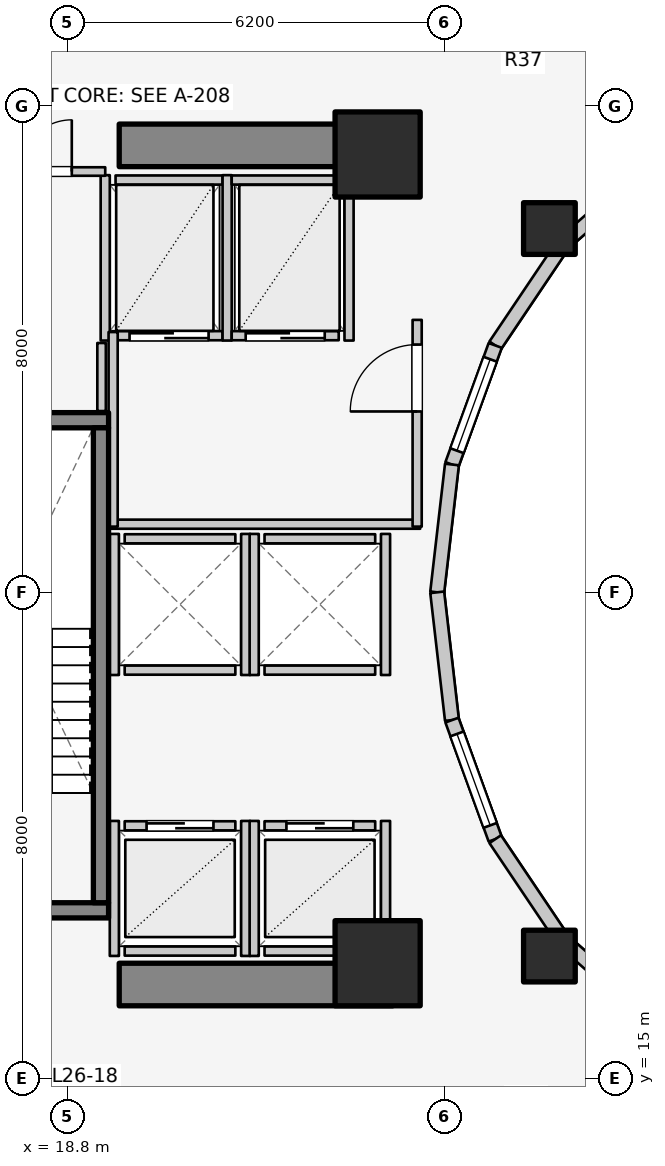
"""IFC4 building model, lengths in metres.
Left out: names, types, materials, properties, quantities, classifications, styles, units other than length and angle.
Written with IfcOpenShell. Run it as: python <this file> out.ifc"""

import sys

from ifc_helpers import new_model, si_unit, direction, frame, frame_2d, origin, origin_2d, place, context, subcontext, project, spatial, rectangle, extrude, element, fill, save


model = new_model("IFC4")
c1 = context("Model", 3, precision=1e-05, world=origin(), true_north=direction((0.0, 1.0)))
c2 = subcontext(c1, "Body", "Model", "MODEL_VIEW")
j1 = project(units=[si_unit("LENGTHUNIT", "METRE"), si_unit("PLANEANGLEUNIT", "RADIAN")], contexts=[c1])
p1 = place(None, origin())
s1 = spatial("IfcSite", under=j1, at=p1, CompositionType="ELEMENT")
p2 = place(p1, origin())
s2 = spatial("IfcBuilding", under=s1, at=p2, CompositionType="ELEMENT")
p3 = place(p2, frame((0.0, 0.0, 88.7)))
s3 = spatial("IfcBuildingStorey", under=s2, at=p3, CompositionType="ELEMENT", Elevation=88.7)
for number, where, z_axis, x_axis in (
    (1, (19.65, 16.55, 0.0), (0.0, 0.0, 1.0), (1.0, 0.0, 0.0)),
    (2, (19.65, 30.35, 0.0), (0.0, 0.0, 1.0), (1.0, 0.0, 0.0)),
):
    element("IfcWall", number, at=place(p3, frame(where, z_axis=z_axis, x_axis=x_axis)), inside=s3, PredefinedType="SHEAR", context=c2, shape_type="SweptSolid", body=[
        extrude(rectangle(XDim=4.5, YDim=0.7, at=frame_2d((2.25, 0.0))), origin(), (0.0, 0.0, 1.0), 3.1),
    ])
p4 = place(p3, frame((16.105, 17.77, 0.0), z_axis=(0.0, 0.0, 1.0), x_axis=(1.0, 0.0, 0.0)))
e3 = element("IfcWall", 3, at=p4, inside=s3, PredefinedType="SOLIDWALL", context=c2, shape_type="SweptSolid", body=[
    extrude(rectangle(XDim=3.37, YDim=0.25, at=frame_2d((1.685, 0.0))), origin(), (0.0, 0.0, 1.0), 3.1),
])
p5 = place(p4, frame((1.135, 0.0, 0.0)))
e4 = element("IfcOpeningElement", 4, at=p5, cuts=e3, PredefinedType="OPENING", context=c2, shape_type="SweptSolid", body=[
    extrude(rectangle(XDim=1.1, YDim=2.1, at=frame_2d((0.55, 1.05))), frame((0.0, 0.135, 0.0), z_axis=(0.0, -1.0, 0.0), x_axis=(1.0, 0.0, 0.0)), (0.0, 0.0, 1.0), 0.27),
])
p6 = place(p3, frame((16.105, 25.83, 0.0), z_axis=(0.0, 0.0, 1.0), x_axis=(1.0, 0.0, 0.0)))
e5 = element("IfcWall", 5, at=p6, inside=s3, PredefinedType="SOLIDWALL", context=c2, shape_type="SweptSolid", body=[
    extrude(rectangle(XDim=3.37, YDim=0.25, at=frame_2d((1.685, 0.0))), origin(), (0.0, 0.0, 1.0), 3.1),
])
p7 = place(p3, frame((19.35, 17.895, 0.0), z_axis=(0.0, 0.0, 1.0), x_axis=(0.0, 1.0, 0.0)))
e6 = element("IfcWall", 6, at=p7, inside=s3, PredefinedType="SOLIDWALL", context=c2, shape_type="SweptSolid", body=[
    extrude(rectangle(XDim=7.81, YDim=0.25, at=frame_2d((3.905, 0.0))), origin(), (0.0, 0.0, 1.0), 3.1),
])
for number, where, z_axis, x_axis in (
    (7, (23.9, 16.9, 0.0), (0.0, 0.0, 1.0), (1.0, 0.0, 0.0)),
    (8, (23.9, 30.2, 0.0), (0.0, 0.0, 1.0), (1.0, 0.0, 0.0)),
):
    element("IfcColumn", number, at=place(p3, frame(where, z_axis=z_axis, x_axis=x_axis)), inside=s3, PredefinedType="COLUMN", context=c2, shape_type="SweptSolid", body=[
        extrude(rectangle(XDim=1.4, YDim=1.4, at=origin_2d()), origin(), (0.0, 0.0, 1.0), 3.1),
    ])
for number, where, z_axis, x_axis in (
    (9, (26.725, 28.982, 0.0), (0.0, 0.0, 1.0), (1.0, 0.0, 0.0)),
    (10, (26.725, 17.018, 0.0), (0.0, 0.0, 1.0), (1.0, 0.0, 0.0)),
):
    element("IfcColumn", number, at=place(p3, frame(where, z_axis=z_axis, x_axis=x_axis)), inside=s3, PredefinedType="COLUMN", context=c2, shape_type="SweptSolid", body=[
        extrude(rectangle(XDim=0.85, YDim=0.85, at=origin_2d()), origin(), (0.0, 0.0, 1.0), 3.1),
    ])
p8 = place(p3, frame((28.44, 30.032, 0.0), z_axis=(0.0, 0.0, 1.0), x_axis=(-0.752576694707, -0.658504607869, 0.0)))
e11 = element("IfcWall", 11, at=p8, inside=s3, PredefinedType="STANDARD", context=c2, shape_type="SweptSolid", body=[
    extrude(rectangle(XDim=1.959, YDim=0.23, at=frame_2d((0.98, 0.0))), origin(), (0.0, 0.0, 1.0), 2.16),
])
p9 = place(p3, frame((26.965, 28.742, 0.0), z_axis=(0.0, 0.0, 1.0), x_axis=(-0.558197800898, -0.829707909492, 0.0)))
e12 = element("IfcWall", 12, at=p9, inside=s3, PredefinedType="STANDARD", context=c2, shape_type="SweptSolid", body=[
    extrude(rectangle(XDim=2.027, YDim=0.23, at=frame_2d((1.013, 0.0))), origin(), (0.0, 0.0, 1.0), 2.16),
])
p10 = place(p3, frame((25.834, 27.06, 0.0), z_axis=(0.0, 0.0, 1.0), x_axis=(-0.341423187295, -0.93990968033, 0.0)))
e13 = element("IfcWall", 13, at=p10, inside=s3, PredefinedType="STANDARD", context=c2, shape_type="SweptSolid", body=[
    extrude(rectangle(XDim=2.084, YDim=0.23, at=frame_2d((1.042, 0.0))), origin(), (0.0, 0.0, 1.0), 2.84),
])
p11 = place(p10, frame((0.242, 0.0, 0.85)))
e14 = element("IfcOpeningElement", 14, at=p11, cuts=e13, PredefinedType="OPENING", context=c2, shape_type="SweptSolid", body=[
    extrude(rectangle(XDim=1.6, YDim=1.65, at=frame_2d((0.8, 0.825))), frame((0.0, 0.125, 0.0), z_axis=(0.0, -1.0, 0.0), x_axis=(1.0, 0.0, 0.0)), (0.0, 0.0, 1.0), 0.25),
])
for number, where, z_axis, x_axis in (
    (15, (25.123, 25.102, 0.0), (0.0, 0.0, 1.0), (-0.115, -0.993, 0.0)),
    (16, (24.88, 23.0, 0.0), (0.0, 0.0, 1.0), (0.115, -0.993, 0.0)),
):
    element("IfcWall", number, at=place(p3, frame(where, z_axis=z_axis, x_axis=x_axis)), inside=s3, PredefinedType="STANDARD", context=c2, shape_type="SweptSolid", body=[
        extrude(rectangle(XDim=2.115, YDim=0.23, at=frame_2d((1.058, 0.0))), origin(), (0.0, 0.0, 1.0), 2.84),
    ])
p12 = place(p3, frame((25.123, 20.898, 0.0), z_axis=(0.0, 0.0, 1.0), x_axis=(0.341423187295, -0.93990968033, 0.0)))
e17 = element("IfcWall", 17, at=p12, inside=s3, PredefinedType="STANDARD", context=c2, shape_type="SweptSolid", body=[
    extrude(rectangle(XDim=2.084, YDim=0.23, at=frame_2d((1.042, 0.0))), origin(), (0.0, 0.0, 1.0), 2.84),
])
p13 = place(p12, frame((0.242, 0.0, 0.85)))
e18 = element("IfcOpeningElement", 18, at=p13, cuts=e17, PredefinedType="OPENING", context=c2, shape_type="SweptSolid", body=[
    extrude(rectangle(XDim=1.6, YDim=1.65, at=frame_2d((0.8, 0.825))), frame((0.0, 0.125, 0.0), z_axis=(0.0, -1.0, 0.0), x_axis=(1.0, 0.0, 0.0)), (0.0, 0.0, 1.0), 0.25),
])
p14 = place(p3, frame((25.834, 18.94, 0.0), z_axis=(0.0, 0.0, 1.0), x_axis=(0.558197800898, -0.829707909492, 0.0)))
e19 = element("IfcWall", 19, at=p14, inside=s3, PredefinedType="STANDARD", context=c2, shape_type="SweptSolid", body=[
    extrude(rectangle(XDim=2.027, YDim=0.23, at=frame_2d((1.013, 0.0))), origin(), (0.0, 0.0, 1.0), 2.16),
])
p15 = place(p3, frame((26.965, 17.258, 0.0), z_axis=(0.0, 0.0, 1.0), x_axis=(0.752576694707, -0.658504607869, 0.0)))
e20 = element("IfcWall", 20, at=p15, inside=s3, PredefinedType="STANDARD", context=c2, shape_type="SweptSolid", body=[
    extrude(rectangle(XDim=1.959, YDim=0.23, at=frame_2d((0.98, 0.0))), origin(), (0.0, 0.0, 1.0), 2.16),
])
p16 = place(p3, frame((19.74, 19.16, 0.0), z_axis=(0.0, 0.0, 1.0), x_axis=(1.0, 0.0, 0.0)))
e21 = element("IfcWall", 21, at=p16, inside=s3, PredefinedType="SOLIDWALL", context=c2, shape_type="SweptSolid", body=[
    extrude(rectangle(XDim=1.82, YDim=0.15, at=frame_2d((0.91, 0.0))), origin(), (0.0, 0.0, 1.0), 2.855),
])
p17 = place(p16, frame((0.36, 0.0, 0.0)))
e22 = element("IfcOpeningElement", 22, at=p17, cuts=e21, PredefinedType="OPENING", context=c2, shape_type="SweptSolid", body=[
    extrude(rectangle(XDim=1.1, YDim=2.1, at=frame_2d((0.55, 1.05))), frame((0.0, 0.085, 0.0), z_axis=(0.0, -1.0, 0.0), x_axis=(1.0, 0.0, 0.0)), (0.0, 0.0, 1.0), 0.17),
])
p18 = place(p3, frame((19.74, 17.1, 0.0), z_axis=(0.0, 0.0, 1.0), x_axis=(1.0, 0.0, 0.0)))
e23 = element("IfcWall", 23, at=p18, inside=s3, PredefinedType="SOLIDWALL", context=c2, shape_type="SweptSolid", body=[
    extrude(rectangle(XDim=1.82, YDim=0.15, at=frame_2d((0.91, 0.0))), origin(), (0.0, 0.0, 1.0), 2.855),
])
p19 = place(p3, frame((19.57, 17.02, 0.0), z_axis=(0.0, 0.0, 1.0), x_axis=(0.0, 1.0, 0.0)))
e24 = element("IfcWall", 24, at=p19, inside=s3, PredefinedType="SOLIDWALL", context=c2, shape_type="SweptSolid", body=[
    extrude(rectangle(XDim=2.22, YDim=0.15, at=frame_2d((1.11, 0.0))), origin(), (0.0, 0.0, 1.0), 2.12),
])
p20 = place(p3, frame((21.73, 17.02, 0.0), z_axis=(0.0, 0.0, 1.0), x_axis=(0.0, 1.0, 0.0)))
e25 = element("IfcWall", 25, at=p20, inside=s3, PredefinedType="SOLIDWALL", context=c2, shape_type="SweptSolid", body=[
    extrude(rectangle(XDim=2.22, YDim=0.15, at=frame_2d((1.11, 0.0))), origin(), (0.0, 0.0, 1.0), 2.855),
])
p21 = place(p3, frame((22.04, 19.16, 0.0), z_axis=(0.0, 0.0, 1.0), x_axis=(1.0, 0.0, 0.0)))
e26 = element("IfcWall", 26, at=p21, inside=s3, PredefinedType="SOLIDWALL", context=c2, shape_type="SweptSolid", body=[
    extrude(rectangle(XDim=1.82, YDim=0.15, at=frame_2d((0.91, 0.0))), origin(), (0.0, 0.0, 1.0), 2.12),
])
p22 = place(p21, frame((0.36, 0.0, 0.0)))
e27 = element("IfcOpeningElement", 27, at=p22, cuts=e26, PredefinedType="OPENING", context=c2, shape_type="SweptSolid", body=[
    extrude(rectangle(XDim=1.1, YDim=2.1, at=frame_2d((0.55, 1.05))), frame((0.0, 0.085, 0.0), z_axis=(0.0, -1.0, 0.0), x_axis=(1.0, 0.0, 0.0)), (0.0, 0.0, 1.0), 0.17),
])
p23 = place(p3, frame((22.04, 17.1, 0.0), z_axis=(0.0, 0.0, 1.0), x_axis=(1.0, 0.0, 0.0)))
e28 = element("IfcWall", 28, at=p23, inside=s3, PredefinedType="SOLIDWALL", context=c2, shape_type="SweptSolid", body=[
    extrude(rectangle(XDim=1.82, YDim=0.15, at=frame_2d((0.91, 0.0))), origin(), (0.0, 0.0, 1.0), 2.12),
])
p24 = place(p3, frame((21.87, 17.02, 0.0), z_axis=(0.0, 0.0, 1.0), x_axis=(0.0, 1.0, 0.0)))
e29 = element("IfcWall", 29, at=p24, inside=s3, PredefinedType="SOLIDWALL", context=c2, shape_type="SweptSolid", body=[
    extrude(rectangle(XDim=2.22, YDim=0.15, at=frame_2d((1.11, 0.0))), origin(), (0.0, 0.0, 1.0), 2.855),
])
p25 = place(p3, frame((24.03, 17.02, 0.0), z_axis=(0.0, 0.0, 1.0), x_axis=(0.0, 1.0, 0.0)))
e30 = element("IfcWall", 30, at=p25, inside=s3, PredefinedType="SOLIDWALL", context=c2, shape_type="SweptSolid", body=[
    extrude(rectangle(XDim=2.22, YDim=0.15, at=frame_2d((1.11, 0.0))), origin(), (0.0, 0.0, 1.0), 2.12),
])
for number, where, z_axis, x_axis in (
    (31, (19.74, 21.72, 0.0), (0.0, 0.0, 1.0), (1.0, 0.0, 0.0)),
    (32, (19.74, 23.88, 0.0), (0.0, 0.0, 1.0), (1.0, 0.0, 0.0)),
):
    element("IfcWall", number, at=place(p3, frame(where, z_axis=z_axis, x_axis=x_axis)), inside=s3, PredefinedType="SOLIDWALL", context=c2, shape_type="SweptSolid", body=[
        extrude(rectangle(XDim=1.82, YDim=0.15, at=frame_2d((0.91, 0.0))), origin(), (0.0, 0.0, 1.0), 2.855),
    ])
for number, where, z_axis, x_axis in (
    (33, (19.57, 21.64, 0.0), (0.0, 0.0, 1.0), (0.0, 1.0, 0.0)),
    (34, (21.73, 21.64, 0.0), (0.0, 0.0, 1.0), (0.0, 1.0, 0.0)),
):
    element("IfcWall", number, at=place(p3, frame(where, z_axis=z_axis, x_axis=x_axis)), inside=s3, PredefinedType="SOLIDWALL", context=c2, shape_type="SweptSolid", body=[
        extrude(rectangle(XDim=2.32, YDim=0.15, at=frame_2d((1.16, 0.0))), origin(), (0.0, 0.0, 1.0), 2.855),
    ])
for number, where, z_axis, x_axis in (
    (35, (22.04, 21.72, 0.0), (0.0, 0.0, 1.0), (1.0, 0.0, 0.0)),
    (36, (22.04, 23.88, 0.0), (0.0, 0.0, 1.0), (1.0, 0.0, 0.0)),
):
    element("IfcWall", number, at=place(p3, frame(where, z_axis=z_axis, x_axis=x_axis)), inside=s3, PredefinedType="SOLIDWALL", context=c2, shape_type="SweptSolid", body=[
        extrude(rectangle(XDim=1.82, YDim=0.15, at=frame_2d((0.91, 0.0))), origin(), (0.0, 0.0, 1.0), 2.12),
    ])
p26 = place(p3, frame((21.87, 21.64, 0.0), z_axis=(0.0, 0.0, 1.0), x_axis=(0.0, 1.0, 0.0)))
e37 = element("IfcWall", 37, at=p26, inside=s3, PredefinedType="SOLIDWALL", context=c2, shape_type="SweptSolid", body=[
    extrude(rectangle(XDim=2.32, YDim=0.15, at=frame_2d((1.16, 0.0))), origin(), (0.0, 0.0, 1.0), 2.855),
])
p27 = place(p3, frame((24.03, 21.64, 0.0), z_axis=(0.0, 0.0, 1.0), x_axis=(0.0, 1.0, 0.0)))
e38 = element("IfcWall", 38, at=p27, inside=s3, PredefinedType="SOLIDWALL", context=c2, shape_type="SweptSolid", body=[
    extrude(rectangle(XDim=2.32, YDim=0.15, at=frame_2d((1.16, 0.0))), origin(), (0.0, 0.0, 1.0), 2.12),
])
p28 = place(p3, frame((19.59, 27.22, 0.0), z_axis=(0.0, 0.0, 1.0), x_axis=(1.0, 0.0, 0.0)))
e39 = element("IfcWall", 39, at=p28, inside=s3, PredefinedType="SOLIDWALL", context=c2, shape_type="SweptSolid", body=[
    extrude(rectangle(XDim=1.76, YDim=0.15, at=frame_2d((0.88, 0.0))), origin(), (0.0, 0.0, 1.0), 2.855),
])
p29 = place(p28, frame((0.23, 0.0, 0.0)))
e40 = element("IfcOpeningElement", 40, at=p29, cuts=e39, PredefinedType="OPENING", context=c2, shape_type="SweptSolid", body=[
    extrude(rectangle(XDim=1.3, YDim=2.1, at=frame_2d((0.65, 1.05))), frame((0.0, 0.085, 0.0), z_axis=(0.0, -1.0, 0.0), x_axis=(1.0, 0.0, 0.0)), (0.0, 0.0, 1.0), 0.17),
])
p30 = place(p3, frame((19.59, 29.78, 0.0), z_axis=(0.0, 0.0, 1.0), x_axis=(1.0, 0.0, 0.0)))
e41 = element("IfcWall", 41, at=p30, inside=s3, PredefinedType="SOLIDWALL", context=c2, shape_type="SweptSolid", body=[
    extrude(rectangle(XDim=1.76, YDim=0.15, at=frame_2d((0.88, 0.0))), origin(), (0.0, 0.0, 1.0), 2.855),
])
for number, where, z_axis, x_axis in (
    (42, (19.42, 27.14, 0.0), (0.0, 0.0, 1.0), (0.0, 1.0, 0.0)),
    (43, (21.425, 27.14, 0.0), (0.0, 0.0, 1.0), (0.0, 1.0, 0.0)),
):
    element("IfcWall", number, at=place(p3, frame(where, z_axis=z_axis, x_axis=x_axis)), inside=s3, PredefinedType="SOLIDWALL", context=c2, shape_type="SweptSolid", body=[
        extrude(rectangle(XDim=2.72, YDim=0.15, at=frame_2d((1.36, 0.0))), origin(), (0.0, 0.0, 1.0), 2.855),
    ])
p31 = place(p3, frame((21.5, 27.22, 0.0), z_axis=(0.0, 0.0, 1.0), x_axis=(1.0, 0.0, 0.0)))
e44 = element("IfcWall", 44, at=p31, inside=s3, PredefinedType="SOLIDWALL", context=c2, shape_type="SweptSolid", body=[
    extrude(rectangle(XDim=1.76, YDim=0.15, at=frame_2d((0.88, 0.0))), origin(), (0.0, 0.0, 1.0), 2.855),
])
p32 = place(p31, frame((0.23, 0.0, 0.0)))
e45 = element("IfcOpeningElement", 45, at=p32, cuts=e44, PredefinedType="OPENING", context=c2, shape_type="SweptSolid", body=[
    extrude(rectangle(XDim=1.3, YDim=2.1, at=frame_2d((0.65, 1.05))), frame((0.0, 0.085, 0.0), z_axis=(0.0, -1.0, 0.0), x_axis=(1.0, 0.0, 0.0)), (0.0, 0.0, 1.0), 0.17),
])
p33 = place(p3, frame((21.5, 29.78, 0.0), z_axis=(0.0, 0.0, 1.0), x_axis=(1.0, 0.0, 0.0)))
e46 = element("IfcWall", 46, at=p33, inside=s3, PredefinedType="SOLIDWALL", context=c2, shape_type="SweptSolid", body=[
    extrude(rectangle(XDim=1.76, YDim=0.15, at=frame_2d((0.88, 0.0))), origin(), (0.0, 0.0, 1.0), 2.855),
])
p34 = place(p3, frame((23.43, 27.14, 0.0), z_axis=(0.0, 0.0, 1.0), x_axis=(0.0, 1.0, 0.0)))
e47 = element("IfcWall", 47, at=p34, inside=s3, PredefinedType="SOLIDWALL", context=c2, shape_type="SweptSolid", body=[
    extrude(rectangle(XDim=2.72, YDim=0.15, at=frame_2d((1.36, 0.0))), origin(), (0.0, 0.0, 1.0), 2.855),
])
p35 = place(p3, frame((19.52, 24.12, 0.0), z_axis=(0.0, 0.0, 1.0), x_axis=(1.0, 0.0, 0.0)))
e48 = element("IfcWall", 48, at=p35, inside=s3, PredefinedType="PARTITIONING", context=c2, shape_type="SweptSolid", body=[
    extrude(rectangle(XDim=5.08, YDim=0.15, at=frame_2d((2.54, 0.0))), origin(), (0.0, 0.0, 1.0), 2.12),
])
p36 = place(p3, frame((19.55, 24.08, 0.0), z_axis=(0.0, 0.0, 1.0), x_axis=(0.0, 1.0, 0.0)))
e49 = element("IfcWall", 49, at=p36, inside=s3, PredefinedType="PARTITIONING", context=c2, shape_type="SweptSolid", body=[
    extrude(rectangle(XDim=3.2, YDim=0.15, at=frame_2d((1.6, 0.0))), origin(), (0.0, 0.0, 1.0), 2.855),
])
p37 = place(p3, frame((24.55, 24.08, 0.0), z_axis=(0.0, 0.0, 1.0), x_axis=(0.0, 1.0, 0.0)))
e50 = element("IfcWall", 50, at=p37, inside=s3, PredefinedType="PARTITIONING", context=c2, shape_type="SweptSolid", body=[
    extrude(rectangle(XDim=3.4, YDim=0.15, at=frame_2d((1.7, 0.0))), origin(), (0.0, 0.0, 1.0), 2.855),
])
p38 = place(p37, frame((1.894, 0.0, 0.0)))
e51 = element("IfcOpeningElement", 51, at=p38, cuts=e50, PredefinedType="OPENING", context=c2, shape_type="SweptSolid", body=[
    extrude(rectangle(XDim=1.1, YDim=2.1, at=frame_2d((0.55, 1.05))), frame((0.0, 0.085, 0.0), z_axis=(0.0, -1.0, 0.0), x_axis=(1.0, 0.0, 0.0)), (0.0, 0.0, 1.0), 0.17),
])
p39 = place(p3, frame((17.52, 29.92, 0.0), z_axis=(0.0, 0.0, 1.0), x_axis=(1.0, 0.0, 0.0)))
e52 = element("IfcWall", 52, at=p39, inside=s3, PredefinedType="PLUMBINGWALL", context=c2, shape_type="SweptSolid", body=[
    extrude(rectangle(XDim=1.9, YDim=0.14, at=frame_2d((0.95, 0.0))), origin(), (0.0, 0.0, 1.0), 2.855),
])
p40 = place(p39, frame((0.5, 0.0, 0.0)))
e53 = element("IfcOpeningElement", 53, at=p40, cuts=e52, PredefinedType="OPENING", context=c2, shape_type="SweptSolid", body=[
    extrude(rectangle(XDim=0.85, YDim=2.05, at=frame_2d((0.425, 1.025))), frame((0.0, 0.08, 0.0), z_axis=(0.0, -1.0, 0.0), x_axis=(1.0, 0.0, 0.0)), (0.0, 0.0, 1.0), 0.16),
])
p41 = place(p3, frame((19.36, 25.98, 0.0), z_axis=(0.0, 0.0, 1.0), x_axis=(0.0, 1.0, 0.0)))
e54 = element("IfcWall", 54, at=p41, inside=s3, PredefinedType="PLUMBINGWALL", context=c2, shape_type="SweptSolid", body=[
    extrude(rectangle(XDim=1.12, YDim=0.14, at=frame_2d((0.56, 0.0))), origin(), (0.0, 0.0, 1.0), 2.855),
])
p42 = place(p11, origin())
e55 = element("IfcWindow", 55, at=p42, inside=s3, PartitioningType="SINGLE_PANEL", PredefinedType="WINDOW", context=c2, shape_type="SweptSolid", body=[
    extrude(rectangle(XDim=1.6, YDim=1.65, at=frame_2d((0.8, 0.825))), frame((0.0, 0.03, 0.0), z_axis=(0.0, -1.0, 0.0), x_axis=(1.0, 0.0, 0.0)), (0.0, 0.0, 1.0), 0.06),
])
fill(e14, e55)
p43 = place(p13, origin())
e56 = element("IfcWindow", 56, at=p43, inside=s3, PartitioningType="SINGLE_PANEL", PredefinedType="WINDOW", context=c2, shape_type="SweptSolid", body=[
    extrude(rectangle(XDim=1.6, YDim=1.65, at=frame_2d((0.8, 0.825))), frame((0.0, 0.03, 0.0), z_axis=(0.0, -1.0, 0.0), x_axis=(1.0, 0.0, 0.0)), (0.0, 0.0, 1.0), 0.06),
])
fill(e18, e56)
p44 = place(p17, origin())
e57 = element("IfcDoor", 57, at=p44, inside=s3, OperationType="DOUBLE_DOOR_SLIDING", PredefinedType="DOOR", context=c2, shape_type="SweptSolid", body=[
    extrude(rectangle(XDim=1.1, YDim=2.1, at=frame_2d((0.55, 1.05))), frame((0.0, 0.025, 0.0), z_axis=(0.0, -1.0, 0.0), x_axis=(1.0, 0.0, 0.0)), (0.0, 0.0, 1.0), 0.05),
])
fill(e22, e57)
p45 = place(p22, origin())
e58 = element("IfcDoor", 58, at=p45, inside=s3, OperationType="DOUBLE_DOOR_SLIDING", PredefinedType="DOOR", context=c2, shape_type="SweptSolid", body=[
    extrude(rectangle(XDim=1.1, YDim=2.1, at=frame_2d((0.55, 1.05))), frame((0.0, 0.025, 0.0), z_axis=(0.0, -1.0, 0.0), x_axis=(1.0, 0.0, 0.0)), (0.0, 0.0, 1.0), 0.05),
])
fill(e27, e58)
p46 = place(p29, origin())
e59 = element("IfcDoor", 59, at=p46, inside=s3, OperationType="DOUBLE_DOOR_SLIDING", PredefinedType="DOOR", context=c2, shape_type="SweptSolid", body=[
    extrude(rectangle(XDim=1.3, YDim=2.1, at=frame_2d((0.65, 1.05))), frame((0.0, 0.025, 0.0), z_axis=(0.0, -1.0, 0.0), x_axis=(1.0, 0.0, 0.0)), (0.0, 0.0, 1.0), 0.05),
])
fill(e40, e59)
p47 = place(p32, origin())
e60 = element("IfcDoor", 60, at=p47, inside=s3, OperationType="DOUBLE_DOOR_SLIDING", PredefinedType="DOOR", context=c2, shape_type="SweptSolid", body=[
    extrude(rectangle(XDim=1.3, YDim=2.1, at=frame_2d((0.65, 1.05))), frame((0.0, 0.025, 0.0), z_axis=(0.0, -1.0, 0.0), x_axis=(1.0, 0.0, 0.0)), (0.0, 0.0, 1.0), 0.05),
])
fill(e45, e60)
p48 = place(p38, origin())
e61 = element("IfcDoor", 61, at=p48, inside=s3, OperationType="SINGLE_SWING_LEFT", PredefinedType="DOOR", context=c2, shape_type="SweptSolid", body=[
    extrude(rectangle(XDim=1.1, YDim=2.1, at=frame_2d((0.55, 1.05))), frame((0.0, 0.025, 0.0), z_axis=(0.0, -1.0, 0.0), x_axis=(1.0, 0.0, 0.0)), (0.0, 0.0, 1.0), 0.05),
])
fill(e51, e61)
p49 = place(p40, origin())
e62 = element("IfcDoor", 62, at=p49, inside=s3, OperationType="SINGLE_SWING_RIGHT", PredefinedType="DOOR", context=c2, shape_type="SweptSolid", body=[
    extrude(rectangle(XDim=0.85, YDim=2.05, at=frame_2d((0.425, 1.025))), frame((0.0, 0.025, 0.0), z_axis=(0.0, -1.0, 0.0), x_axis=(1.0, 0.0, 0.0)), (0.0, 0.0, 1.0), 0.05),
])
fill(e53, e62)
save(model, sys.argv[1])
